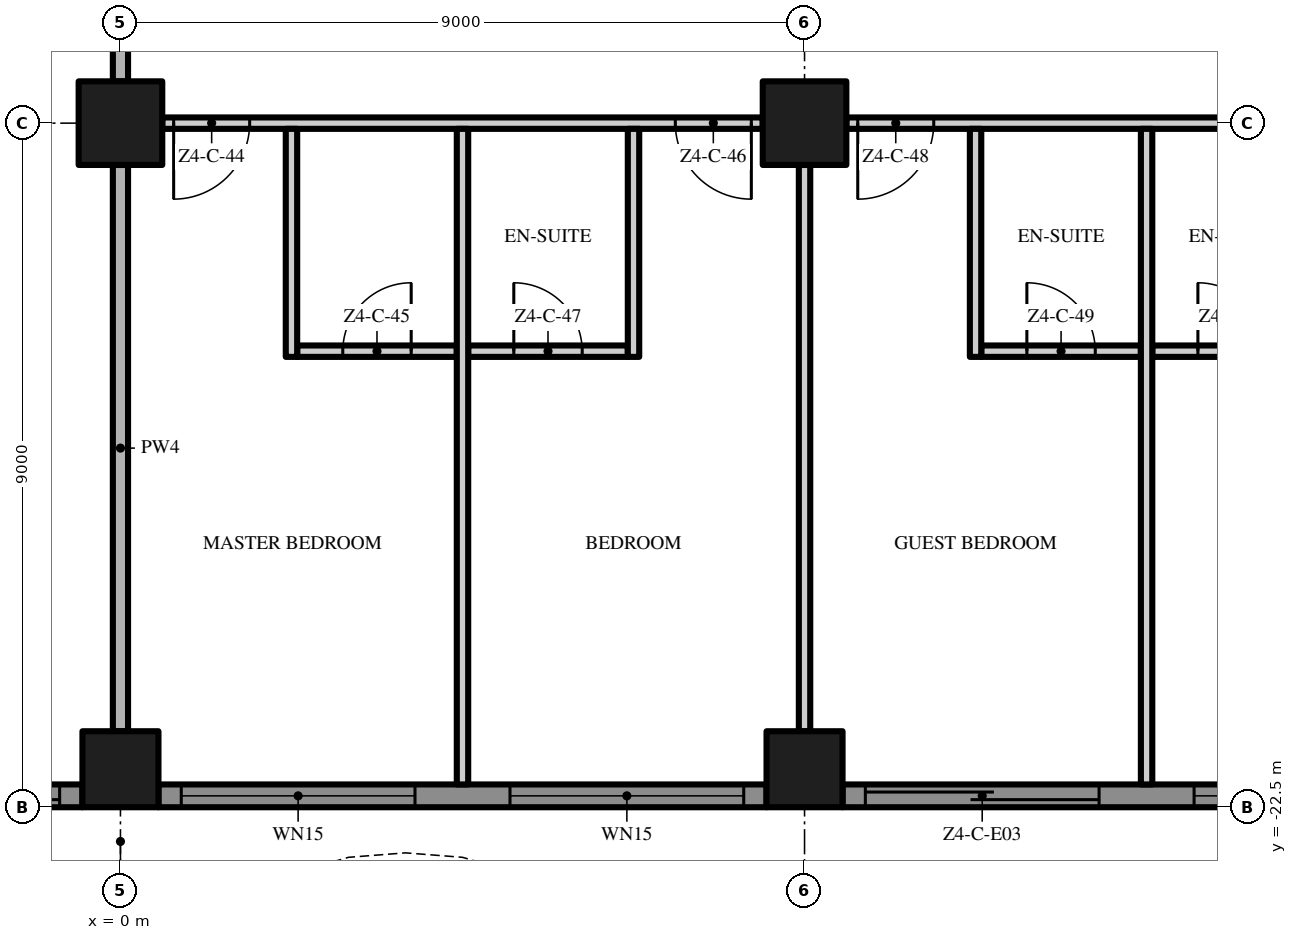
"""IFC4 building model, lengths in metres.
Left out: names, types, materials, properties, quantities, classifications, styles, units other than length and angle.
Written with IfcOpenShell. Run it as: python <this file> out.ifc"""

import sys

from ifc_helpers import new_model, si_unit, direction, frame, frame_2d, origin, origin_2d, place, context, subcontext, project, spatial, polyline, rectangle, outline, extrude, element, fill, save


model = new_model("IFC4")
c1 = context("Model", 3, precision=1e-05, world=origin(), true_north=direction((0.0, 1.0)))
c2 = subcontext(c1, "Body", "Model", "MODEL_VIEW")
j1 = project(units=[si_unit("LENGTHUNIT", "METRE"), si_unit("PLANEANGLEUNIT", "RADIAN")], contexts=[c1])
p1 = place(None, origin())
s1 = spatial("IfcSite", under=j1, at=p1, CompositionType="ELEMENT")
p2 = place(p1, origin())
s2 = spatial("IfcBuilding", under=s1, at=p2, CompositionType="ELEMENT")
p3 = place(p2, frame((0.0, 0.0, 211.0)))
s3 = spatial("IfcBuildingStorey", under=s2, at=p3, CompositionType="ELEMENT", Elevation=211.0)
p4 = place(p3, frame((0.0, -13.5, 0.0), z_axis=(0.0, 0.0, 1.0), x_axis=(1.0, 0.0, 0.0)))
e1 = element("IfcColumn", 1, at=p4, inside=s3, PredefinedType="COLUMN", context=c2, shape_type="SweptSolid", body=[
    extrude(rectangle(XDim=1.1, YDim=1.1, at=origin_2d()), origin(), (0.0, 0.0, 1.0), 3.5),
])
p5 = place(p3, frame((0.0, -22.0, 0.0), z_axis=(0.0, 0.0, 1.0), x_axis=(1.0, 0.0, 0.0)))
e2 = element("IfcColumn", 2, at=p5, inside=s3, PredefinedType="COLUMN", context=c2, shape_type="SweptSolid", body=[
    extrude(rectangle(XDim=1.0, YDim=1.0, at=origin_2d()), origin(), (0.0, 0.0, 1.0), 3.5),
])
p6 = place(p3, frame((9.0, -13.5, 0.0), z_axis=(0.0, 0.0, 1.0), x_axis=(1.0, 0.0, 0.0)))
e3 = element("IfcColumn", 3, at=p6, inside=s3, PredefinedType="COLUMN", context=c2, shape_type="SweptSolid", body=[
    extrude(rectangle(XDim=1.1, YDim=1.1, at=origin_2d()), origin(), (0.0, 0.0, 1.0), 3.5),
])
p7 = place(p3, frame((9.0, -22.0, 0.0), z_axis=(0.0, 0.0, 1.0), x_axis=(1.0, 0.0, 0.0)))
e4 = element("IfcColumn", 4, at=p7, inside=s3, PredefinedType="COLUMN", context=c2, shape_type="SweptSolid", body=[
    extrude(rectangle(XDim=1.0, YDim=1.0, at=origin_2d()), origin(), (0.0, 0.0, 1.0), 3.5),
])
p8 = place(p3, frame((-0.5, -22.35, 0.0), z_axis=(0.0, 0.0, 1.0), x_axis=(-1.0, 0.0, 0.0)))
e5 = element("IfcWall", 5, at=p8, inside=s3, PredefinedType="SOLIDWALL", context=c2, shape_type="SweptSolid", body=[
    extrude(rectangle(XDim=8.0, YDim=0.3, at=frame_2d((4.0, 0.0))), origin(), (0.0, 0.0, 1.0), 3.5),
])
p9 = place(p8, frame((4.625, 0.0, 0.45)))
e6 = element("IfcOpeningElement", 6, at=p9, cuts=e5, PredefinedType="OPENING", context=c2, shape_type="SweptSolid", body=[
    extrude(rectangle(XDim=3.075, YDim=2.65, at=frame_2d((1.538, 1.325))), frame((0.0, 0.16, 0.0), z_axis=(0.0, -1.0, 0.0), x_axis=(1.0, 0.0, 0.0)), (0.0, 0.0, 1.0), 0.32),
])
p10 = place(p8, frame((0.3, 0.0, 0.0)))
e7 = element("IfcOpeningElement", 7, at=p10, cuts=e5, PredefinedType="OPENING", context=c2, shape_type="SweptSolid", body=[
    extrude(rectangle(XDim=3.075, YDim=2.4, at=frame_2d((1.538, 1.2))), frame((0.0, 0.16, 0.0), z_axis=(0.0, -1.0, 0.0), x_axis=(1.0, 0.0, 0.0)), (0.0, 0.0, 1.0), 0.32),
])
p11 = place(p3, frame((8.5, -22.35, 0.0), z_axis=(0.0, 0.0, 1.0), x_axis=(-1.0, 0.0, 0.0)))
e8 = element("IfcWall", 8, at=p11, inside=s3, PredefinedType="SOLIDWALL", context=c2, shape_type="SweptSolid", body=[
    extrude(rectangle(XDim=8.0, YDim=0.3, at=frame_2d((4.0, 0.0))), origin(), (0.0, 0.0, 1.0), 3.5),
])
p12 = place(p11, frame((4.625, 0.0, 0.45)))
e9 = element("IfcOpeningElement", 9, at=p12, cuts=e8, PredefinedType="OPENING", context=c2, shape_type="SweptSolid", body=[
    extrude(rectangle(XDim=3.075, YDim=2.65, at=frame_2d((1.538, 1.325))), frame((0.0, 0.16, 0.0), z_axis=(0.0, -1.0, 0.0), x_axis=(1.0, 0.0, 0.0)), (0.0, 0.0, 1.0), 0.32),
])
p13 = place(p11, frame((0.3, 0.0, 0.45)))
e10 = element("IfcOpeningElement", 10, at=p13, cuts=e8, PredefinedType="OPENING", context=c2, shape_type="SweptSolid", body=[
    extrude(rectangle(XDim=3.075, YDim=2.65, at=frame_2d((1.538, 1.325))), frame((0.0, 0.16, 0.0), z_axis=(0.0, -1.0, 0.0), x_axis=(1.0, 0.0, 0.0)), (0.0, 0.0, 1.0), 0.32),
])
p14 = place(p3, frame((17.5, -22.35, 0.0), z_axis=(0.0, 0.0, 1.0), x_axis=(-1.0, 0.0, 0.0)))
e11 = element("IfcWall", 11, at=p14, inside=s3, PredefinedType="SOLIDWALL", context=c2, shape_type="SweptSolid", body=[
    extrude(rectangle(XDim=8.0, YDim=0.3, at=frame_2d((4.0, 0.0))), origin(), (0.0, 0.0, 1.0), 3.5),
])
p15 = place(p14, frame((4.625, 0.0, 0.0)))
e12 = element("IfcOpeningElement", 12, at=p15, cuts=e11, PredefinedType="OPENING", context=c2, shape_type="SweptSolid", body=[
    extrude(rectangle(XDim=3.075, YDim=2.4, at=frame_2d((1.538, 1.2))), frame((0.0, 0.16, 0.0), z_axis=(0.0, -1.0, 0.0), x_axis=(1.0, 0.0, 0.0)), (0.0, 0.0, 1.0), 0.32),
])
p16 = place(p14, frame((0.3, 0.0, 0.45)))
e13 = element("IfcOpeningElement", 13, at=p16, cuts=e11, PredefinedType="OPENING", context=c2, shape_type="SweptSolid", body=[
    extrude(rectangle(XDim=3.075, YDim=2.65, at=frame_2d((1.538, 1.325))), frame((0.0, 0.16, 0.0), z_axis=(0.0, -1.0, 0.0), x_axis=(1.0, 0.0, 0.0)), (0.0, 0.0, 1.0), 0.32),
])
p17 = place(p3, origin())
e14 = element("IfcWall", 14, at=p17, inside=s3, PredefinedType="USERDEFINED", context=c2, shape_type="SweptSolid", body=[
    extrude(outline(polyline([(-22.5, -24.3), (-21.0, -25.005), (-19.5, -25.441), (-18.75, -25.5), (-18.0, -25.441), (-16.5, -25.005), (-15.0, -24.3), (-13.5, -23.595), (-12.0, -23.159), (-11.25, -23.1), (-10.5, -23.159), (-9.0, -23.595), (-7.5, -24.3), (-6.0, -25.005), (-4.5, -25.441), (-3.75, -25.5), (-3.0, -25.441), (-1.5, -25.005), (0.0, -24.3), (1.5, -23.595), (3.0, -23.159), (3.75, -23.1), (4.5, -23.159), (6.0, -23.595), (7.5, -24.3), (9.0, -25.005), (10.5, -25.441), (11.25, -25.5), (12.0, -25.441), (13.5, -25.005), (15.0, -24.3), (16.5, -23.595), (18.0, -23.159), (18.75, -23.1), (19.5, -23.159), (21.0, -23.595), (22.5, -24.3), (22.606, -24.074), (21.089, -23.36), (19.545, -22.911), (18.75, -22.849), (17.955, -22.911), (16.411, -23.36), (14.894, -24.074), (13.411, -24.771), (11.955, -25.194), (11.25, -25.249), (10.545, -25.194), (9.089, -24.771), (7.606, -24.074), (6.089, -23.36), (4.545, -22.911), (3.75, -22.849), (2.955, -22.911), (1.411, -23.36), (-0.106, -24.074), (-1.589, -24.771), (-3.045, -25.194), (-3.75, -25.249), (-4.455, -25.194), (-5.911, -24.771), (-7.394, -24.074), (-8.911, -23.36), (-10.455, -22.911), (-11.25, -22.849), (-12.045, -22.911), (-13.589, -23.36), (-15.106, -24.074), (-16.589, -24.771), (-18.045, -25.194), (-18.75, -25.249), (-19.455, -25.194), (-20.911, -24.771), (-22.394, -24.074), (-22.5, -24.3)])), origin(), (0.0, 0.0, 1.0), 0.9),
])
p18 = place(p3, frame((2.325, -16.5, 0.0), z_axis=(0.0, 0.0, 1.0), x_axis=(1.0, 0.0, 0.0)))
e15 = element("IfcWall", 15, at=p18, inside=s3, PredefinedType="PARTITIONING", context=c2, shape_type="SweptSolid", body=[
    extrude(rectangle(XDim=2.1, YDim=0.15, at=frame_2d((1.05, 0.0))), origin(), (0.0, 0.0, 1.0), 3.5),
])
p19 = place(p18, frame((0.6, 0.0, 0.0)))
e16 = element("IfcOpeningElement", 16, at=p19, cuts=e15, PredefinedType="OPENING", context=c2, shape_type="SweptSolid", body=[
    extrude(rectangle(XDim=0.9, YDim=2.1, at=frame_2d((0.45, 1.05))), frame((0.0, 0.085, 0.0), z_axis=(0.0, -1.0, 0.0), x_axis=(1.0, 0.0, 0.0)), (0.0, 0.0, 1.0), 0.17),
])
p20 = place(p3, frame((4.575, -16.5, 0.0), z_axis=(0.0, 0.0, 1.0), x_axis=(1.0, 0.0, 0.0)))
e17 = element("IfcWall", 17, at=p20, inside=s3, PredefinedType="PARTITIONING", context=c2, shape_type="SweptSolid", body=[
    extrude(rectangle(XDim=2.1, YDim=0.15, at=frame_2d((1.05, 0.0))), origin(), (0.0, 0.0, 1.0), 3.5),
])
p21 = place(p20, frame((0.6, 0.0, 0.0)))
e18 = element("IfcOpeningElement", 18, at=p21, cuts=e17, PredefinedType="OPENING", context=c2, shape_type="SweptSolid", body=[
    extrude(rectangle(XDim=0.9, YDim=2.1, at=frame_2d((0.45, 1.05))), frame((0.0, 0.085, 0.0), z_axis=(0.0, -1.0, 0.0), x_axis=(1.0, 0.0, 0.0)), (0.0, 0.0, 1.0), 0.17),
])
p22 = place(p3, frame((11.325, -16.5, 0.0), z_axis=(0.0, 0.0, 1.0), x_axis=(1.0, 0.0, 0.0)))
e19 = element("IfcWall", 19, at=p22, inside=s3, PredefinedType="PARTITIONING", context=c2, shape_type="SweptSolid", body=[
    extrude(rectangle(XDim=2.1, YDim=0.15, at=frame_2d((1.05, 0.0))), origin(), (0.0, 0.0, 1.0), 3.5),
])
p23 = place(p22, frame((0.6, 0.0, 0.0)))
e20 = element("IfcOpeningElement", 20, at=p23, cuts=e19, PredefinedType="OPENING", context=c2, shape_type="SweptSolid", body=[
    extrude(rectangle(XDim=0.9, YDim=2.1, at=frame_2d((0.45, 1.05))), frame((0.0, 0.085, 0.0), z_axis=(0.0, -1.0, 0.0), x_axis=(1.0, 0.0, 0.0)), (0.0, 0.0, 1.0), 0.17),
])
p24 = place(p3, frame((13.575, -16.5, 0.0), z_axis=(0.0, 0.0, 1.0), x_axis=(1.0, 0.0, 0.0)))
e21 = element("IfcWall", 21, at=p24, inside=s3, PredefinedType="PARTITIONING", context=c2, shape_type="SweptSolid", body=[
    extrude(rectangle(XDim=2.1, YDim=0.15, at=frame_2d((1.05, 0.0))), origin(), (0.0, 0.0, 1.0), 3.5),
])
p25 = place(p24, frame((0.6, 0.0, 0.0)))
e22 = element("IfcOpeningElement", 22, at=p25, cuts=e21, PredefinedType="OPENING", context=c2, shape_type="SweptSolid", body=[
    extrude(rectangle(XDim=0.9, YDim=2.1, at=frame_2d((0.45, 1.05))), frame((0.0, 0.085, 0.0), z_axis=(0.0, -1.0, 0.0), x_axis=(1.0, 0.0, 0.0)), (0.0, 0.0, 1.0), 0.17),
])
p26 = place(p3, frame((8.45, -13.5, 0.0), z_axis=(0.0, 0.0, 1.0), x_axis=(-1.0, 0.0, 0.0)))
e23 = element("IfcWall", 23, at=p26, inside=s3, PredefinedType="PARTITIONING", context=c2, shape_type="SweptSolid", body=[
    extrude(rectangle(XDim=7.9, YDim=0.15, at=frame_2d((3.95, 0.0))), origin(), (0.0, 0.0, 1.0), 3.5),
])
p27 = place(p26, frame((6.75, 0.0, 0.0)))
e24 = element("IfcOpeningElement", 24, at=p27, cuts=e23, PredefinedType="OPENING", context=c2, shape_type="SweptSolid", body=[
    extrude(rectangle(XDim=1.0, YDim=2.4, at=frame_2d((0.5, 1.2))), frame((0.0, 0.085, 0.0), z_axis=(0.0, -1.0, 0.0), x_axis=(1.0, 0.0, 0.0)), (0.0, 0.0, 1.0), 0.17),
])
p28 = place(p26, frame((0.15, 0.0, 0.0)))
e25 = element("IfcOpeningElement", 25, at=p28, cuts=e23, PredefinedType="OPENING", context=c2, shape_type="SweptSolid", body=[
    extrude(rectangle(XDim=1.0, YDim=2.4, at=frame_2d((0.5, 1.2))), frame((0.0, 0.085, 0.0), z_axis=(0.0, -1.0, 0.0), x_axis=(1.0, 0.0, 0.0)), (0.0, 0.0, 1.0), 0.17),
])
p29 = place(p3, frame((17.45, -13.5, 0.0), z_axis=(0.0, 0.0, 1.0), x_axis=(-1.0, 0.0, 0.0)))
e26 = element("IfcWall", 26, at=p29, inside=s3, PredefinedType="PARTITIONING", context=c2, shape_type="SweptSolid", body=[
    extrude(rectangle(XDim=7.9, YDim=0.15, at=frame_2d((3.95, 0.0))), origin(), (0.0, 0.0, 1.0), 3.5),
])
p30 = place(p29, frame((6.75, 0.0, 0.0)))
e27 = element("IfcOpeningElement", 27, at=p30, cuts=e26, PredefinedType="OPENING", context=c2, shape_type="SweptSolid", body=[
    extrude(rectangle(XDim=1.0, YDim=2.4, at=frame_2d((0.5, 1.2))), frame((0.0, 0.085, 0.0), z_axis=(0.0, -1.0, 0.0), x_axis=(1.0, 0.0, 0.0)), (0.0, 0.0, 1.0), 0.17),
])
p31 = place(p29, frame((0.15, 0.0, 0.0)))
e28 = element("IfcOpeningElement", 28, at=p31, cuts=e26, PredefinedType="OPENING", context=c2, shape_type="SweptSolid", body=[
    extrude(rectangle(XDim=1.0, YDim=2.4, at=frame_2d((0.5, 1.2))), frame((0.0, 0.085, 0.0), z_axis=(0.0, -1.0, 0.0), x_axis=(1.0, 0.0, 0.0)), (0.0, 0.0, 1.0), 0.17),
])
p32 = place(p3, frame((0.0, -21.5, 0.0), z_axis=(0.0, 0.0, 1.0), x_axis=(0.0, 1.0, 0.0)))
e29 = element("IfcWall", 29, at=p32, inside=s3, PredefinedType="PARTITIONING", context=c2, shape_type="SweptSolid", body=[
    extrude(rectangle(XDim=7.45, YDim=0.2, at=frame_2d((3.725, 0.0))), origin(), (0.0, 0.0, 1.0), 3.5),
])
p33 = place(p3, frame((0.0, -12.95, 0.0), z_axis=(0.0, 0.0, 1.0), x_axis=(0.0, 1.0, 0.0)))
e30 = element("IfcWall", 30, at=p33, inside=s3, PredefinedType="PARTITIONING", context=c2, shape_type="SweptSolid", body=[
    extrude(rectangle(XDim=7.9, YDim=0.2, at=frame_2d((3.95, 0.0))), origin(), (0.0, 0.0, 1.0), 3.5),
])
p34 = place(p3, frame((2.25, -16.575, 0.0), z_axis=(0.0, 0.0, 1.0), x_axis=(0.0, 1.0, 0.0)))
e31 = element("IfcWall", 31, at=p34, inside=s3, PredefinedType="PARTITIONING", context=c2, shape_type="SweptSolid", body=[
    extrude(rectangle(XDim=3.0, YDim=0.15, at=frame_2d((1.5, 0.0))), origin(), (0.0, 0.0, 1.0), 3.5),
])
p35 = place(p3, frame((4.5, -22.2, 0.0), z_axis=(0.0, 0.0, 1.0), x_axis=(0.0, 1.0, 0.0)))
e32 = element("IfcWall", 32, at=p35, inside=s3, PredefinedType="PARTITIONING", context=c2, shape_type="SweptSolid", body=[
    extrude(rectangle(XDim=8.625, YDim=0.15, at=frame_2d((4.312, 0.0))), origin(), (0.0, 0.0, 1.0), 3.5),
])
p36 = place(p3, frame((6.75, -16.575, 0.0), z_axis=(0.0, 0.0, 1.0), x_axis=(0.0, 1.0, 0.0)))
e33 = element("IfcWall", 33, at=p36, inside=s3, PredefinedType="PARTITIONING", context=c2, shape_type="SweptSolid", body=[
    extrude(rectangle(XDim=3.0, YDim=0.15, at=frame_2d((1.5, 0.0))), origin(), (0.0, 0.0, 1.0), 3.5),
])
p37 = place(p3, frame((9.0, -21.5, 0.0), z_axis=(0.0, 0.0, 1.0), x_axis=(0.0, 1.0, 0.0)))
e34 = element("IfcWall", 34, at=p37, inside=s3, PredefinedType="PARTITIONING", context=c2, shape_type="SweptSolid", body=[
    extrude(rectangle(XDim=7.45, YDim=0.15, at=frame_2d((3.725, 0.0))), origin(), (0.0, 0.0, 1.0), 3.5),
])
p38 = place(p3, frame((11.25, -16.575, 0.0), z_axis=(0.0, 0.0, 1.0), x_axis=(0.0, 1.0, 0.0)))
e35 = element("IfcWall", 35, at=p38, inside=s3, PredefinedType="PARTITIONING", context=c2, shape_type="SweptSolid", body=[
    extrude(rectangle(XDim=3.0, YDim=0.15, at=frame_2d((1.5, 0.0))), origin(), (0.0, 0.0, 1.0), 3.5),
])
p39 = place(p3, frame((13.5, -22.2, 0.0), z_axis=(0.0, 0.0, 1.0), x_axis=(0.0, 1.0, 0.0)))
e36 = element("IfcWall", 36, at=p39, inside=s3, PredefinedType="PARTITIONING", context=c2, shape_type="SweptSolid", body=[
    extrude(rectangle(XDim=8.625, YDim=0.15, at=frame_2d((4.312, 0.0))), origin(), (0.0, 0.0, 1.0), 3.5),
])
p40 = place(p10, origin())
e37 = element("IfcDoor", 37, at=p40, inside=s3, OperationType="SINGLE_SWING_LEFT", PredefinedType="DOOR", context=c2, shape_type="SweptSolid", body=[
    extrude(rectangle(XDim=3.075, YDim=2.4, at=frame_2d((1.538, 1.2))), frame((0.0, 0.025, 0.0), z_axis=(0.0, -1.0, 0.0), x_axis=(1.0, 0.0, 0.0)), (0.0, 0.0, 1.0), 0.05),
])
fill(e7, e37)
p41 = place(p12, origin())
e38 = element("IfcWindow", 38, at=p41, inside=s3, PartitioningType="SINGLE_PANEL", PredefinedType="WINDOW", context=c2, shape_type="SweptSolid", body=[
    extrude(rectangle(XDim=3.075, YDim=2.65, at=frame_2d((1.538, 1.325))), frame((0.0, 0.03, 0.0), z_axis=(0.0, -1.0, 0.0), x_axis=(1.0, 0.0, 0.0)), (0.0, 0.0, 1.0), 0.06),
])
fill(e9, e38)
p42 = place(p13, origin())
e39 = element("IfcWindow", 39, at=p42, inside=s3, PartitioningType="SINGLE_PANEL", PredefinedType="WINDOW", context=c2, shape_type="SweptSolid", body=[
    extrude(rectangle(XDim=3.075, YDim=2.65, at=frame_2d((1.538, 1.325))), frame((0.0, 0.03, 0.0), z_axis=(0.0, -1.0, 0.0), x_axis=(1.0, 0.0, 0.0)), (0.0, 0.0, 1.0), 0.06),
])
fill(e10, e39)
p43 = place(p15, origin())
e40 = element("IfcDoor", 40, at=p43, inside=s3, OperationType="SINGLE_SWING_LEFT", PredefinedType="DOOR", context=c2, shape_type="SweptSolid", body=[
    extrude(rectangle(XDim=3.075, YDim=2.4, at=frame_2d((1.538, 1.2))), frame((0.0, 0.025, 0.0), z_axis=(0.0, -1.0, 0.0), x_axis=(1.0, 0.0, 0.0)), (0.0, 0.0, 1.0), 0.05),
])
fill(e12, e40)
p44 = place(p16, origin())
e41 = element("IfcWindow", 41, at=p44, inside=s3, PartitioningType="SINGLE_PANEL", PredefinedType="WINDOW", context=c2, shape_type="SweptSolid", body=[
    extrude(rectangle(XDim=3.075, YDim=2.65, at=frame_2d((1.538, 1.325))), frame((0.0, 0.03, 0.0), z_axis=(0.0, -1.0, 0.0), x_axis=(1.0, 0.0, 0.0)), (0.0, 0.0, 1.0), 0.06),
])
fill(e13, e41)
p45 = place(p27, origin())
e42 = element("IfcDoor", 42, at=p45, inside=s3, OperationType="SINGLE_SWING_RIGHT", PredefinedType="DOOR", context=c2, shape_type="SweptSolid", body=[
    extrude(rectangle(XDim=1.0, YDim=2.4, at=frame_2d((0.5, 1.2))), frame((0.0, 0.025, 0.0), z_axis=(0.0, -1.0, 0.0), x_axis=(1.0, 0.0, 0.0)), (0.0, 0.0, 1.0), 0.05),
])
fill(e24, e42)
p46 = place(p19, origin())
e43 = element("IfcDoor", 43, at=p46, inside=s3, OperationType="SINGLE_SWING_RIGHT", PredefinedType="DOOR", context=c2, shape_type="SweptSolid", body=[
    extrude(rectangle(XDim=0.9, YDim=2.1, at=frame_2d((0.45, 1.05))), frame((0.0, 0.025, 0.0), z_axis=(0.0, -1.0, 0.0), x_axis=(1.0, 0.0, 0.0)), (0.0, 0.0, 1.0), 0.05),
])
fill(e16, e43)
p47 = place(p28, origin())
e44 = element("IfcDoor", 44, at=p47, inside=s3, OperationType="SINGLE_SWING_LEFT", PredefinedType="DOOR", context=c2, shape_type="SweptSolid", body=[
    extrude(rectangle(XDim=1.0, YDim=2.4, at=frame_2d((0.5, 1.2))), frame((0.0, 0.025, 0.0), z_axis=(0.0, -1.0, 0.0), x_axis=(1.0, 0.0, 0.0)), (0.0, 0.0, 1.0), 0.05),
])
fill(e25, e44)
p48 = place(p21, origin())
e45 = element("IfcDoor", 45, at=p48, inside=s3, OperationType="SINGLE_SWING_LEFT", PredefinedType="DOOR", context=c2, shape_type="SweptSolid", body=[
    extrude(rectangle(XDim=0.9, YDim=2.1, at=frame_2d((0.45, 1.05))), frame((0.0, 0.025, 0.0), z_axis=(0.0, -1.0, 0.0), x_axis=(1.0, 0.0, 0.0)), (0.0, 0.0, 1.0), 0.05),
])
fill(e18, e45)
p49 = place(p30, origin())
e46 = element("IfcDoor", 46, at=p49, inside=s3, OperationType="SINGLE_SWING_RIGHT", PredefinedType="DOOR", context=c2, shape_type="SweptSolid", body=[
    extrude(rectangle(XDim=1.0, YDim=2.4, at=frame_2d((0.5, 1.2))), frame((0.0, 0.025, 0.0), z_axis=(0.0, -1.0, 0.0), x_axis=(1.0, 0.0, 0.0)), (0.0, 0.0, 1.0), 0.05),
])
fill(e27, e46)
p50 = place(p23, origin())
e47 = element("IfcDoor", 47, at=p50, inside=s3, OperationType="SINGLE_SWING_LEFT", PredefinedType="DOOR", context=c2, shape_type="SweptSolid", body=[
    extrude(rectangle(XDim=0.9, YDim=2.1, at=frame_2d((0.45, 1.05))), frame((0.0, 0.025, 0.0), z_axis=(0.0, -1.0, 0.0), x_axis=(1.0, 0.0, 0.0)), (0.0, 0.0, 1.0), 0.05),
])
fill(e20, e47)
p51 = place(p25, origin())
e48 = element("IfcDoor", 48, at=p51, inside=s3, OperationType="SINGLE_SWING_LEFT", PredefinedType="DOOR", context=c2, shape_type="SweptSolid", body=[
    extrude(rectangle(XDim=0.9, YDim=2.1, at=frame_2d((0.45, 1.05))), frame((0.0, 0.025, 0.0), z_axis=(0.0, -1.0, 0.0), x_axis=(1.0, 0.0, 0.0)), (0.0, 0.0, 1.0), 0.05),
])
fill(e22, e48)
save(model, sys.argv[1])
